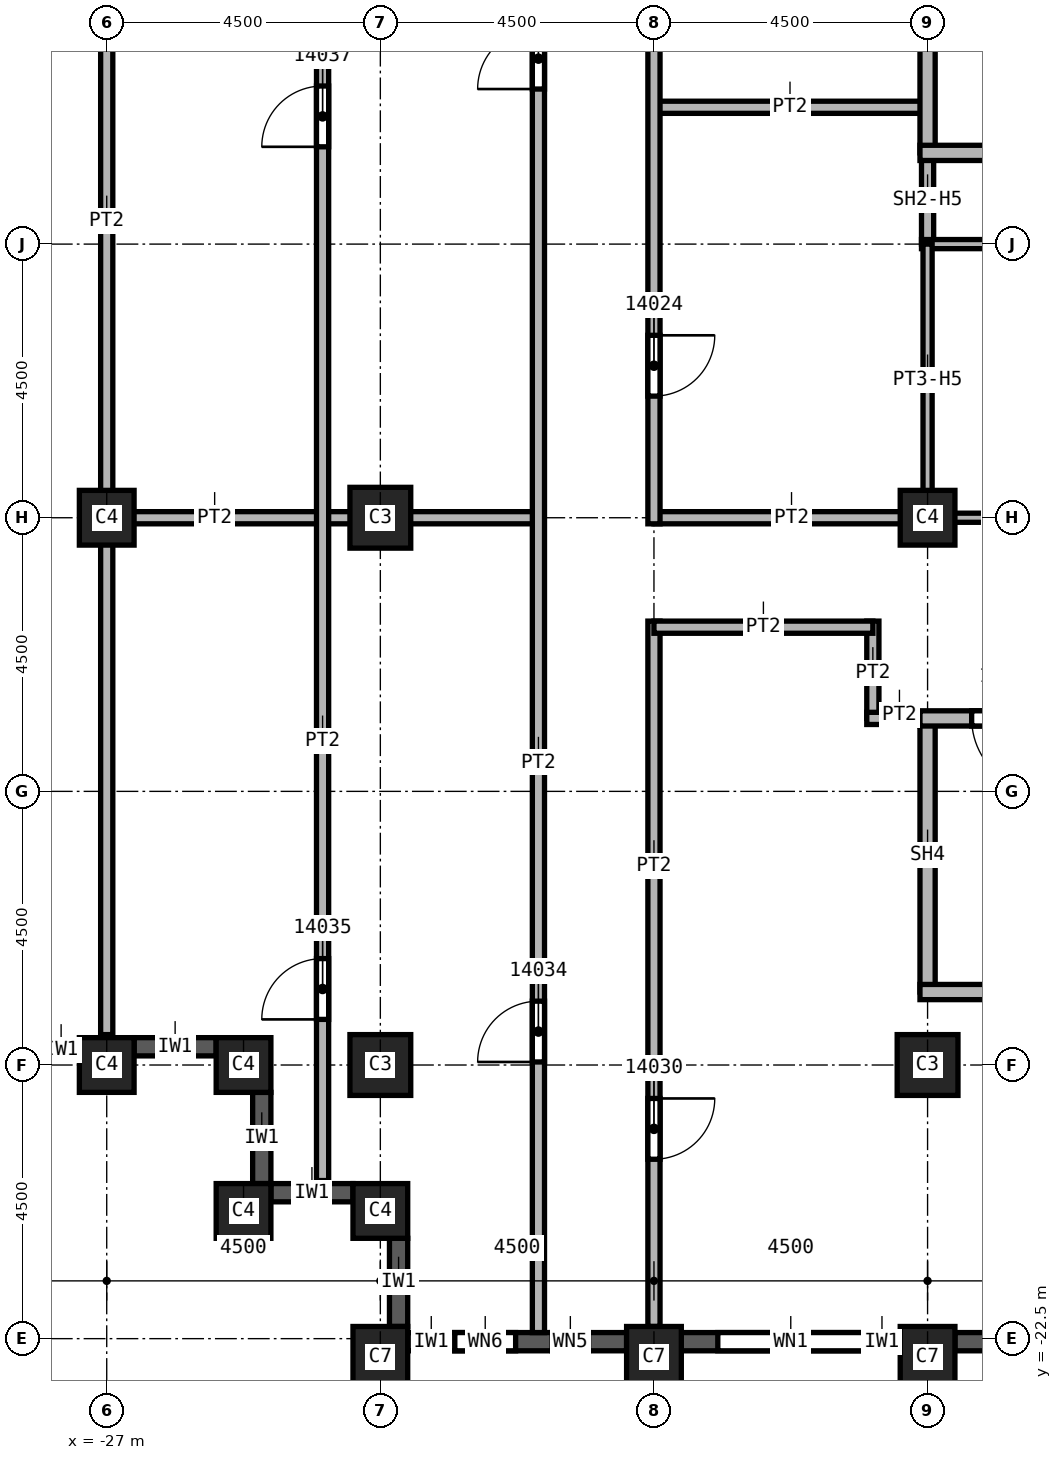
"""IFC4 building model, lengths in metres.
Left out: names, types, materials, properties, quantities, classifications, styles, units other than length and angle.
Written with IfcOpenShell. Run it as: python <this file> out.ifc"""

import sys

from ifc_helpers import new_model, si_unit, direction, frame, frame_2d, origin, origin_2d, place, context, subcontext, project, spatial, rectangle, extrude, element, fill, save


model = new_model("IFC4")
c1 = context("Model", 3, precision=1e-05, world=origin(), true_north=direction((0.0, 1.0)))
c2 = subcontext(c1, "Body", "Model", "MODEL_VIEW")
j1 = project(units=[si_unit("LENGTHUNIT", "METRE"), si_unit("PLANEANGLEUNIT", "RADIAN")], contexts=[c1])
p1 = place(None, origin())
s1 = spatial("IfcSite", under=j1, at=p1, CompositionType="ELEMENT")
p2 = place(p1, origin())
s2 = spatial("IfcBuilding", under=s1, at=p2, CompositionType="ELEMENT")
p3 = place(p2, frame((0.0, 0.0, 224.0)))
s3 = spatial("IfcBuildingStorey", under=s2, at=p3, CompositionType="ELEMENT", Elevation=224.0)
for number, where, z_axis, x_axis in (
    (1, (-13.5, -18.0, 0.0), (0.0, 0.0, 1.0), (1.0, 0.0, 0.0)),
    (2, (-22.5, -9.0, 0.0), (0.0, 0.0, 1.0), (1.0, 0.0, 0.0)),
    (3, (-22.5, -18.0, 0.0), (0.0, 0.0, 1.0), (1.0, 0.0, 0.0)),
):
    element("IfcColumn", number, at=place(p3, frame(where, z_axis=z_axis, x_axis=x_axis)), inside=s3, PredefinedType="COLUMN", context=c2, shape_type="SweptSolid", body=[
        extrude(rectangle(XDim=1.0, YDim=1.0, at=origin_2d()), origin(), (0.0, 0.0, 1.0), 3.72),
    ])
p4 = place(p3, frame((-13.5, -9.0, 0.0), z_axis=(0.0, 0.0, 1.0), x_axis=(1.0, 0.0, 0.0)))
e4 = element("IfcColumn", 4, at=p4, inside=s3, PredefinedType="COLUMN", context=c2, shape_type="SweptSolid", body=[
    extrude(rectangle(XDim=0.9, YDim=0.9, at=origin_2d()), origin(), (0.0, 0.0, 1.0), 3.72),
])
for number, where, z_axis, x_axis in (
    (5, (-13.5, -22.8, 0.0), (0.0, 0.0, 1.0), (1.0, 0.0, 0.0)),
    (6, (-18.0, -22.8, 0.0), (0.0, 0.0, 1.0), (1.0, 0.0, 0.0)),
    (7, (-22.5, -22.8, 0.0), (0.0, 0.0, 1.0), (1.0, 0.0, 0.0)),
):
    element("IfcColumn", number, at=place(p3, frame(where, z_axis=z_axis, x_axis=x_axis)), inside=s3, PredefinedType="COLUMN", context=c2, shape_type="SweptSolid", body=[
        extrude(rectangle(XDim=0.9, YDim=1.0, at=origin_2d()), origin(), (0.0, 0.0, 1.0), 3.72),
    ])
for number, where, z_axis, x_axis in (
    (8, (-27.0, -9.0, 0.0), (0.0, 0.0, 1.0), (1.0, 0.0, 0.0)),
    (9, (-27.0, -18.0, 0.0), (0.0, 0.0, 1.0), (1.0, 0.0, 0.0)),
    (10, (-22.5, -20.4, 0.0), (0.0, 0.0, 1.0), (1.0, 0.0, 0.0)),
    (11, (-24.75, -20.4, 0.0), (0.0, 0.0, 1.0), (1.0, 0.0, 0.0)),
    (12, (-24.75, -18.0, 0.0), (0.0, 0.0, 1.0), (1.0, 0.0, 0.0)),
):
    element("IfcColumn", number, at=place(p3, frame(where, z_axis=z_axis, x_axis=x_axis)), inside=s3, PredefinedType="COLUMN", context=c2, shape_type="SweptSolid", body=[
        extrude(rectangle(XDim=0.9, YDim=0.9, at=origin_2d()), origin(), (0.0, 0.0, 1.0), 3.72),
    ])
p5 = place(p3, frame((-31.05, -17.75, 0.0), z_axis=(0.0, 0.0, 1.0), x_axis=(1.0, 0.0, 0.0)))
e13 = element("IfcWall", 13, at=p5, inside=s3, PredefinedType="SOLIDWALL", context=c2, shape_type="SweptSolid", body=[
    extrude(rectangle(XDim=3.6, YDim=0.3, at=frame_2d((1.8, 0.0))), origin(), (0.0, 0.0, 1.0), 3.12),
])
p6 = place(p5, frame((0.6, 0.0, 0.8)))
e14 = element("IfcOpeningElement", 14, at=p6, cuts=e13, PredefinedType="OPENING", context=c2, shape_type="SweptSolid", body=[
    extrude(rectangle(XDim=1.0, YDim=1.95, at=frame_2d((0.5, 0.975))), frame((0.0, 0.15, 0.0), z_axis=(0.0, -1.0, 0.0), x_axis=(1.0, 0.0, 0.0)), (0.0, 0.0, 1.0), 0.3),
])
p7 = place(p5, frame((2.0, 0.0, 0.8)))
e15 = element("IfcOpeningElement", 15, at=p7, cuts=e13, PredefinedType="OPENING", context=c2, shape_type="SweptSolid", body=[
    extrude(rectangle(XDim=1.0, YDim=1.95, at=frame_2d((0.5, 0.975))), frame((0.0, 0.15, 0.0), z_axis=(0.0, -1.0, 0.0), x_axis=(1.0, 0.0, 0.0)), (0.0, 0.0, 1.0), 0.3),
])
p8 = place(p3, frame((-26.55, -17.7, 0.0), z_axis=(0.0, 0.0, 1.0), x_axis=(1.0, 0.0, 0.0)))
e16 = element("IfcWall", 16, at=p8, inside=s3, PredefinedType="SOLIDWALL", context=c2, shape_type="SweptSolid", body=[
    extrude(rectangle(XDim=1.35, YDim=0.3, at=frame_2d((0.675, 0.0))), origin(), (0.0, 0.0, 1.0), 3.12),
])
p9 = place(p3, frame((-24.45, -18.45, 0.0), z_axis=(0.0, 0.0, 1.0), x_axis=(0.0, -1.0, 0.0)))
e17 = element("IfcWall", 17, at=p9, inside=s3, PredefinedType="SOLIDWALL", context=c2, shape_type="SweptSolid", body=[
    extrude(rectangle(XDim=1.5, YDim=0.3, at=frame_2d((0.75, 0.0))), origin(), (0.0, 0.0, 1.0), 3.12),
])
p10 = place(p3, frame((-24.3, -20.1, 0.0), z_axis=(0.0, 0.0, 1.0), x_axis=(1.0, 0.0, 0.0)))
e18 = element("IfcWall", 18, at=p10, inside=s3, PredefinedType="SOLIDWALL", context=c2, shape_type="SweptSolid", body=[
    extrude(rectangle(XDim=1.35, YDim=0.3, at=frame_2d((0.675, 0.0))), origin(), (0.0, 0.0, 1.0), 3.12),
])
p11 = place(p3, frame((-22.2, -20.85, 0.0), z_axis=(0.0, 0.0, 1.0), x_axis=(0.0, -1.0, 0.0)))
e19 = element("IfcWall", 19, at=p11, inside=s3, PredefinedType="SOLIDWALL", context=c2, shape_type="SweptSolid", body=[
    extrude(rectangle(XDim=1.45, YDim=0.3, at=frame_2d((0.725, 0.0))), origin(), (0.0, 0.0, 1.0), 3.12),
])
p12 = place(p3, frame((-22.05, -22.55, 0.0), z_axis=(0.0, 0.0, 1.0), x_axis=(1.0, 0.0, 0.0)))
e20 = element("IfcWall", 20, at=p12, inside=s3, PredefinedType="SOLIDWALL", context=c2, shape_type="SweptSolid", body=[
    extrude(rectangle(XDim=3.6, YDim=0.3, at=frame_2d((1.8, 0.0))), origin(), (0.0, 0.0, 1.0), 3.12),
])
p13 = place(p12, frame((0.775, 0.0, 0.8)))
e21 = element("IfcOpeningElement", 21, at=p13, cuts=e20, PredefinedType="OPENING", context=c2, shape_type="SweptSolid", body=[
    extrude(rectangle(XDim=1.0, YDim=1.95, at=frame_2d((0.5, 0.975))), frame((0.0, 0.15, 0.0), z_axis=(0.0, -1.0, 0.0), x_axis=(1.0, 0.0, 0.0)), (0.0, 0.0, 1.0), 0.3),
])
p14 = place(p12, frame((2.375, 0.0, 0.8)))
e22 = element("IfcOpeningElement", 22, at=p14, cuts=e20, PredefinedType="OPENING", context=c2, shape_type="SweptSolid", body=[
    extrude(rectangle(XDim=0.6, YDim=1.95, at=frame_2d((0.3, 0.975))), frame((0.0, 0.15, 0.0), z_axis=(0.0, -1.0, 0.0), x_axis=(1.0, 0.0, 0.0)), (0.0, 0.0, 1.0), 0.3),
])
p15 = place(p3, frame((-17.55, -22.55, 0.0), z_axis=(0.0, 0.0, 1.0), x_axis=(1.0, 0.0, 0.0)))
e23 = element("IfcWall", 23, at=p15, inside=s3, PredefinedType="SOLIDWALL", context=c2, shape_type="SweptSolid", body=[
    extrude(rectangle(XDim=3.6, YDim=0.3, at=frame_2d((1.8, 0.0))), origin(), (0.0, 0.0, 1.0), 3.12),
])
p16 = place(p15, frame((0.6, 0.0, 0.8)))
e24 = element("IfcOpeningElement", 24, at=p16, cuts=e23, PredefinedType="OPENING", context=c2, shape_type="SweptSolid", body=[
    extrude(rectangle(XDim=2.4, YDim=1.95, at=frame_2d((1.2, 0.975))), frame((0.0, 0.15, 0.0), z_axis=(0.0, -1.0, 0.0), x_axis=(1.0, 0.0, 0.0)), (0.0, 0.0, 1.0), 0.3),
])
p17 = place(p3, frame((-13.05, -22.55, 0.0), z_axis=(0.0, 0.0, 1.0), x_axis=(1.0, 0.0, 0.0)))
e25 = element("IfcWall", 25, at=p17, inside=s3, PredefinedType="SOLIDWALL", context=c2, shape_type="SweptSolid", body=[
    extrude(rectangle(XDim=3.6, YDim=0.3, at=frame_2d((1.8, 0.0))), origin(), (0.0, 0.0, 1.0), 3.12),
])
p18 = place(p17, frame((0.6, 0.0, 0.8)))
e26 = element("IfcOpeningElement", 26, at=p18, cuts=e25, PredefinedType="OPENING", context=c2, shape_type="SweptSolid", body=[
    extrude(rectangle(XDim=2.4, YDim=1.95, at=frame_2d((1.2, 0.975))), frame((0.0, 0.15, 0.0), z_axis=(0.0, -1.0, 0.0), x_axis=(1.0, 0.0, 0.0)), (0.0, 0.0, 1.0), 0.3),
])
p19 = place(p3, frame((-27.1, -9.0, 0.0), z_axis=(0.0, 0.0, 1.0), x_axis=(1.0, 0.0, 0.0)))
e27 = element("IfcWall", 27, at=p19, inside=s3, PredefinedType="PARTITIONING", context=c2, shape_type="SweptSolid", body=[
    extrude(rectangle(XDim=7.2, YDim=0.2, at=frame_2d((3.6, 0.0))), origin(), (0.0, 0.0, 1.0), 3.72),
])
p20 = place(p3, frame((-27.0, -17.5, 0.0), z_axis=(0.0, 0.0, 1.0), x_axis=(0.0, 1.0, 0.0)))
e28 = element("IfcWall", 28, at=p20, inside=s3, PredefinedType="PARTITIONING", context=c2, shape_type="SweptSolid", body=[
    extrude(rectangle(XDim=18.25, YDim=0.2, at=frame_2d((9.125, 0.0))), origin(), (0.0, 0.0, 1.0), 3.72),
])
p21 = place(p3, frame((-23.45, -19.9, 0.0), z_axis=(0.0, 0.0, 1.0), x_axis=(0.0, 1.0, 0.0)))
e29 = element("IfcWall", 29, at=p21, inside=s3, PredefinedType="PARTITIONING", context=c2, shape_type="SweptSolid", body=[
    extrude(rectangle(XDim=20.65, YDim=0.2, at=frame_2d((10.325, 0.0))), origin(), (0.0, 0.0, 1.0), 3.72),
])
p22 = place(p21, frame((2.65, 0.0, 0.0)))
e30 = element("IfcOpeningElement", 30, at=p22, cuts=e29, PredefinedType="OPENING", context=c2, shape_type="SweptSolid", body=[
    extrude(rectangle(XDim=1.0, YDim=2.1, at=frame_2d((0.5, 1.05))), frame((0.0, 0.1, 0.0), z_axis=(0.0, -1.0, 0.0), x_axis=(1.0, 0.0, 0.0)), (0.0, 0.0, 1.0), 0.2),
])
p23 = place(p21, frame((17.0, 0.0, 0.0)))
e31 = element("IfcOpeningElement", 31, at=p23, cuts=e29, PredefinedType="OPENING", context=c2, shape_type="SweptSolid", body=[
    extrude(rectangle(XDim=1.0, YDim=2.1, at=frame_2d((0.5, 1.05))), frame((0.0, 0.1, 0.0), z_axis=(0.0, -1.0, 0.0), x_axis=(1.0, 0.0, 0.0)), (0.0, 0.0, 1.0), 0.2),
])
p24 = place(p3, frame((-19.9, -22.4, 0.0), z_axis=(0.0, 0.0, 1.0), x_axis=(0.0, 1.0, 0.0)))
e32 = element("IfcWall", 32, at=p24, inside=s3, PredefinedType="PARTITIONING", context=c2, shape_type="SweptSolid", body=[
    extrude(rectangle(XDim=23.25, YDim=0.2, at=frame_2d((11.625, 0.0))), origin(), (0.0, 0.0, 1.0), 3.72),
])
p25 = place(p24, frame((4.45, 0.0, 0.0)))
e33 = element("IfcOpeningElement", 33, at=p25, cuts=e32, PredefinedType="OPENING", context=c2, shape_type="SweptSolid", body=[
    extrude(rectangle(XDim=1.0, YDim=2.1, at=frame_2d((0.5, 1.05))), frame((0.0, 0.1, 0.0), z_axis=(0.0, -1.0, 0.0), x_axis=(1.0, 0.0, 0.0)), (0.0, 0.0, 1.0), 0.2),
])
p26 = place(p24, frame((20.45, 0.0, 0.0)))
e34 = element("IfcOpeningElement", 34, at=p26, cuts=e32, PredefinedType="OPENING", context=c2, shape_type="SweptSolid", body=[
    extrude(rectangle(XDim=1.0, YDim=2.1, at=frame_2d((0.5, 1.05))), frame((0.0, 0.1, 0.0), z_axis=(0.0, -1.0, 0.0), x_axis=(1.0, 0.0, 0.0)), (0.0, 0.0, 1.0), 0.2),
])
p27 = place(p3, frame((-18.0, -10.7, 0.0), z_axis=(0.0, 0.0, 1.0), x_axis=(0.0, -1.0, 0.0)))
e35 = element("IfcWall", 35, at=p27, inside=s3, PredefinedType="PARTITIONING", context=c2, shape_type="SweptSolid", body=[
    extrude(rectangle(XDim=11.6, YDim=0.2, at=frame_2d((5.8, 0.0))), origin(), (0.0, 0.0, 1.0), 3.72),
])
p28 = place(p27, frame((7.85, 0.0, 0.0)))
e36 = element("IfcOpeningElement", 36, at=p28, cuts=e35, PredefinedType="OPENING", context=c2, shape_type="SweptSolid", body=[
    extrude(rectangle(XDim=1.0, YDim=2.1, at=frame_2d((0.5, 1.05))), frame((0.0, 0.1, 0.0), z_axis=(0.0, -1.0, 0.0), x_axis=(1.0, 0.0, 0.0)), (0.0, 0.0, 1.0), 0.2),
])
for number, where, z_axis, x_axis in (
    (37, (-18.0, -9.0, 0.0), (0.0, 0.0, 1.0), (1.0, 0.0, 0.0)),
    (38, (-18.0, -2.25, 0.0), (0.0, 0.0, 1.0), (1.0, 0.0, 0.0)),
):
    element("IfcWall", number, at=place(p3, frame(where, z_axis=z_axis, x_axis=x_axis)), inside=s3, PredefinedType="PARTITIONING", context=c2, shape_type="SweptSolid", body=[
        extrude(rectangle(XDim=4.5, YDim=0.2, at=frame_2d((2.25, 0.0))), origin(), (0.0, 0.0, 1.0), 3.72),
    ])
p29 = place(p3, frame((-18.0, 9.1, 0.0), z_axis=(0.0, 0.0, 1.0), x_axis=(0.0, -1.0, 0.0)))
e39 = element("IfcWall", 39, at=p29, inside=s3, PredefinedType="PARTITIONING", context=c2, shape_type="SweptSolid", body=[
    extrude(rectangle(XDim=18.2, YDim=0.2, at=frame_2d((9.1, 0.0))), origin(), (0.0, 0.0, 1.0), 3.72),
])
p30 = place(p29, frame((15.1, 0.0, 0.0)))
e40 = element("IfcOpeningElement", 40, at=p30, cuts=e39, PredefinedType="OPENING", context=c2, shape_type="SweptSolid", body=[
    extrude(rectangle(XDim=1.0, YDim=2.1, at=frame_2d((0.5, 1.05))), frame((0.0, 0.1, 0.0), z_axis=(0.0, -1.0, 0.0), x_axis=(1.0, 0.0, 0.0)), (0.0, 0.0, 1.0), 0.2),
])
p31 = place(p29, frame((5.2, 0.0, 0.0)))
e41 = element("IfcOpeningElement", 41, at=p31, cuts=e39, PredefinedType="OPENING", context=c2, shape_type="SweptSolid", body=[
    extrude(rectangle(XDim=1.0, YDim=2.1, at=frame_2d((0.5, 1.05))), frame((0.0, 0.1, 0.0), z_axis=(0.0, -1.0, 0.0), x_axis=(1.0, 0.0, 0.0)), (0.0, 0.0, 1.0), 0.2),
])
p32 = place(p3, frame((-14.4, -12.3, 0.0), z_axis=(0.0, 0.0, 1.0), x_axis=(0.0, 1.0, 0.0)))
e42 = element("IfcWall", 42, at=p32, inside=s3, PredefinedType="PARTITIONING", context=c2, shape_type="SweptSolid", body=[
    extrude(rectangle(XDim=1.6, YDim=0.2, at=frame_2d((0.8, 0.0))), origin(), (0.0, 0.0, 1.0), 3.72),
])
p33 = place(p3, frame((-14.4, -10.8, 0.0), z_axis=(0.0, 0.0, 1.0), x_axis=(-1.0, 0.0, 0.0)))
e43 = element("IfcWall", 43, at=p33, inside=s3, PredefinedType="PARTITIONING", context=c2, shape_type="SweptSolid", body=[
    extrude(rectangle(XDim=3.6, YDim=0.2, at=frame_2d((1.8, 0.0))), origin(), (0.0, 0.0, 1.0), 3.72),
])
p34 = place(p3, frame((-13.375, -12.3, 0.0), z_axis=(0.0, 0.0, 1.0), x_axis=(-1.0, 0.0, 0.0)))
e44 = element("IfcWall", 44, at=p34, inside=s3, PredefinedType="PARTITIONING", context=c2, shape_type="SweptSolid", body=[
    extrude(rectangle(XDim=1.125, YDim=0.2, at=frame_2d((0.562, 0.0))), origin(), (0.0, 0.0, 1.0), 3.72),
])
p35 = place(p3, frame((-13.5, -4.5, 0.0), z_axis=(0.0, 0.0, 1.0), x_axis=(0.0, 1.0, 0.0)))
e45 = element("IfcWall", 45, at=p35, inside=s3, PredefinedType="SOLIDWALL", context=c2, shape_type="SweptSolid", body=[
    extrude(rectangle(XDim=1.5, YDim=0.2, at=frame_2d((0.75, 0.0))), origin(), (0.0, 0.0, 1.0), 2.958),
])
p36 = place(p3, frame((-13.5, -3.0, 0.0), z_axis=(0.0, 0.0, 1.0), x_axis=(0.0, 1.0, 0.0)))
e46 = element("IfcWall", 46, at=p36, inside=s3, PredefinedType="SOLIDWALL", context=c2, shape_type="SweptSolid", body=[
    extrude(rectangle(XDim=6.0, YDim=0.25, at=frame_2d((3.0, 0.0))), origin(), (0.0, 0.0, 1.0), 2.958),
])
p37 = place(p3, frame((-13.625, -3.0, 0.0), z_axis=(0.0, 0.0, 1.0), x_axis=(1.0, 0.0, 0.0)))
e47 = element("IfcWall", 47, at=p37, inside=s3, PredefinedType="SOLIDWALL", context=c2, shape_type="SweptSolid", body=[
    extrude(rectangle(XDim=6.125, YDim=0.25, at=frame_2d((3.062, 0.0))), origin(), (0.0, 0.0, 1.0), 3.72),
])
p38 = place(p37, frame((3.25, 0.0, 0.0)))
e48 = element("IfcOpeningElement", 48, at=p38, cuts=e47, PredefinedType="OPENING", context=c2, shape_type="SweptSolid", body=[
    extrude(rectangle(XDim=1.1, YDim=2.1, at=frame_2d((0.55, 1.05))), frame((0.0, 0.125, 0.0), z_axis=(0.0, -1.0, 0.0), x_axis=(1.0, 0.0, 0.0)), (0.0, 0.0, 1.0), 0.25),
])
p39 = place(p3, frame((-13.5, -16.8, 0.0), z_axis=(0.0, 0.0, 1.0), x_axis=(0.0, 1.0, 0.0)))
e49 = element("IfcWall", 49, at=p39, inside=s3, PredefinedType="SOLIDWALL", context=c2, shape_type="SweptSolid", body=[
    extrude(rectangle(XDim=4.5, YDim=0.25, at=frame_2d((2.25, 0.0))), origin(), (0.0, 0.0, 1.0), 3.72),
])
p40 = place(p3, frame((-4.5, -16.8, 0.0), z_axis=(0.0, 0.0, 1.0), x_axis=(-1.0, 0.0, 0.0)))
e50 = element("IfcWall", 50, at=p40, inside=s3, PredefinedType="SOLIDWALL", context=c2, shape_type="SweptSolid", body=[
    extrude(rectangle(XDim=9.125, YDim=0.25, at=frame_2d((4.562, 0.0))), origin(), (0.0, 0.0, 1.0), 3.72),
])
p41 = place(p3, frame((-4.375, -12.3, 0.0), z_axis=(0.0, 0.0, 1.0), x_axis=(-1.0, 0.0, 0.0)))
e51 = element("IfcWall", 51, at=p41, inside=s3, PredefinedType="SOLIDWALL", context=c2, shape_type="SweptSolid", body=[
    extrude(rectangle(XDim=9.25, YDim=0.25, at=frame_2d((4.625, 0.0))), origin(), (0.0, 0.0, 1.0), 3.72),
])
p42 = place(p41, frame((7.2, 0.0, 0.0)))
e52 = element("IfcOpeningElement", 52, at=p42, cuts=e51, PredefinedType="OPENING", context=c2, shape_type="SweptSolid", body=[
    extrude(rectangle(XDim=1.2, YDim=2.1, at=frame_2d((0.6, 1.05))), frame((0.0, 0.125, 0.0), z_axis=(0.0, -1.0, 0.0), x_axis=(1.0, 0.0, 0.0)), (0.0, 0.0, 1.0), 0.25),
])
p43 = place(p3, frame((-13.6, -4.5, 0.0), z_axis=(0.0, 0.0, 1.0), x_axis=(1.0, 0.0, 0.0)))
e53 = element("IfcWall", 53, at=p43, inside=s3, PredefinedType="PARTITIONING", context=c2, shape_type="SweptSolid", body=[
    extrude(rectangle(XDim=3.1, YDim=0.15, at=frame_2d((1.55, 0.0))), origin(), (0.0, 0.0, 1.0), 3.72),
])
p44 = place(p3, frame((-13.5, -9.1, 0.0), z_axis=(0.0, 0.0, 1.0), x_axis=(0.0, 1.0, 0.0)))
e54 = element("IfcWall", 54, at=p44, inside=s3, PredefinedType="PARTITIONING", context=c2, shape_type="SweptSolid", body=[
    extrude(rectangle(XDim=4.6, YDim=0.15, at=frame_2d((2.3, 0.0))), origin(), (0.0, 0.0, 1.0), 2.958),
])
p45 = place(p3, frame((-10.5, -9.0, 0.0), z_axis=(0.0, 0.0, 1.0), x_axis=(-1.0, 0.0, 0.0)))
e55 = element("IfcWall", 55, at=p45, inside=s3, PredefinedType="PARTITIONING", context=c2, shape_type="SweptSolid", body=[
    extrude(rectangle(XDim=3.075, YDim=0.15, at=frame_2d((1.538, 0.0))), origin(), (0.0, 0.0, 1.0), 2.958),
])
p46 = place(p16, origin())
e56 = element("IfcWindow", 56, at=p46, inside=s3, PartitioningType="SINGLE_PANEL", PredefinedType="WINDOW", context=c2, shape_type="SweptSolid", body=[
    extrude(rectangle(XDim=2.4, YDim=1.95, at=frame_2d((1.2, 0.975))), frame((0.0, 0.03, 0.0), z_axis=(0.0, -1.0, 0.0), x_axis=(1.0, 0.0, 0.0)), (0.0, 0.0, 1.0), 0.06),
])
fill(e24, e56)
p47 = place(p42, origin())
e57 = element("IfcDoor", 57, at=p47, inside=s3, OperationType="SINGLE_SWING_RIGHT", PredefinedType="DOOR", context=c2, shape_type="SweptSolid", body=[
    extrude(rectangle(XDim=1.2, YDim=2.1, at=frame_2d((0.6, 1.05))), frame((0.0, 0.025, 0.0), z_axis=(0.0, -1.0, 0.0), x_axis=(1.0, 0.0, 0.0)), (0.0, 0.0, 1.0), 0.05),
])
fill(e52, e57)
p48 = place(p30, origin())
e58 = element("IfcDoor", 58, at=p48, inside=s3, OperationType="SINGLE_SWING_LEFT", PredefinedType="DOOR", context=c2, shape_type="SweptSolid", body=[
    extrude(rectangle(XDim=1.0, YDim=2.1, at=frame_2d((0.5, 1.05))), frame((0.0, 0.025, 0.0), z_axis=(0.0, -1.0, 0.0), x_axis=(1.0, 0.0, 0.0)), (0.0, 0.0, 1.0), 0.05),
])
fill(e40, e58)
p49 = place(p28, origin())
e59 = element("IfcDoor", 59, at=p49, inside=s3, OperationType="SINGLE_SWING_LEFT", PredefinedType="DOOR", context=c2, shape_type="SweptSolid", body=[
    extrude(rectangle(XDim=1.0, YDim=2.1, at=frame_2d((0.5, 1.05))), frame((0.0, 0.025, 0.0), z_axis=(0.0, -1.0, 0.0), x_axis=(1.0, 0.0, 0.0)), (0.0, 0.0, 1.0), 0.05),
])
fill(e36, e59)
p50 = place(p25, origin())
e60 = element("IfcDoor", 60, at=p50, inside=s3, OperationType="SINGLE_SWING_LEFT", PredefinedType="DOOR", context=c2, shape_type="SweptSolid", body=[
    extrude(rectangle(XDim=1.0, YDim=2.1, at=frame_2d((0.5, 1.05))), frame((0.0, 0.025, 0.0), z_axis=(0.0, -1.0, 0.0), x_axis=(1.0, 0.0, 0.0)), (0.0, 0.0, 1.0), 0.05),
])
fill(e33, e60)
p51 = place(p22, origin())
e61 = element("IfcDoor", 61, at=p51, inside=s3, OperationType="SINGLE_SWING_RIGHT", PredefinedType="DOOR", context=c2, shape_type="SweptSolid", body=[
    extrude(rectangle(XDim=1.0, YDim=2.1, at=frame_2d((0.5, 1.05))), frame((0.0, 0.025, 0.0), z_axis=(0.0, -1.0, 0.0), x_axis=(1.0, 0.0, 0.0)), (0.0, 0.0, 1.0), 0.05),
])
fill(e30, e61)
p52 = place(p26, origin())
e62 = element("IfcDoor", 62, at=p52, inside=s3, OperationType="SINGLE_SWING_LEFT", PredefinedType="DOOR", context=c2, shape_type="SweptSolid", body=[
    extrude(rectangle(XDim=1.0, YDim=2.1, at=frame_2d((0.5, 1.05))), frame((0.0, 0.025, 0.0), z_axis=(0.0, -1.0, 0.0), x_axis=(1.0, 0.0, 0.0)), (0.0, 0.0, 1.0), 0.05),
])
fill(e34, e62)
p53 = place(p23, origin())
e63 = element("IfcDoor", 63, at=p53, inside=s3, OperationType="SINGLE_SWING_RIGHT", PredefinedType="DOOR", context=c2, shape_type="SweptSolid", body=[
    extrude(rectangle(XDim=1.0, YDim=2.1, at=frame_2d((0.5, 1.05))), frame((0.0, 0.025, 0.0), z_axis=(0.0, -1.0, 0.0), x_axis=(1.0, 0.0, 0.0)), (0.0, 0.0, 1.0), 0.05),
])
fill(e31, e63)
p54 = place(p13, origin())
e64 = element("IfcWindow", 64, at=p54, inside=s3, PartitioningType="SINGLE_PANEL", PredefinedType="WINDOW", context=c2, shape_type="SweptSolid", body=[
    extrude(rectangle(XDim=1.0, YDim=1.95, at=frame_2d((0.5, 0.975))), frame((0.0, 0.03, 0.0), z_axis=(0.0, -1.0, 0.0), x_axis=(1.0, 0.0, 0.0)), (0.0, 0.0, 1.0), 0.06),
])
fill(e21, e64)
p55 = place(p14, origin())
e65 = element("IfcWindow", 65, at=p55, inside=s3, PartitioningType="SINGLE_PANEL", PredefinedType="WINDOW", context=c2, shape_type="SweptSolid", body=[
    extrude(rectangle(XDim=0.6, YDim=1.95, at=frame_2d((0.3, 0.975))), frame((0.0, 0.03, 0.0), z_axis=(0.0, -1.0, 0.0), x_axis=(1.0, 0.0, 0.0)), (0.0, 0.0, 1.0), 0.06),
])
fill(e22, e65)
save(model, sys.argv[1])
